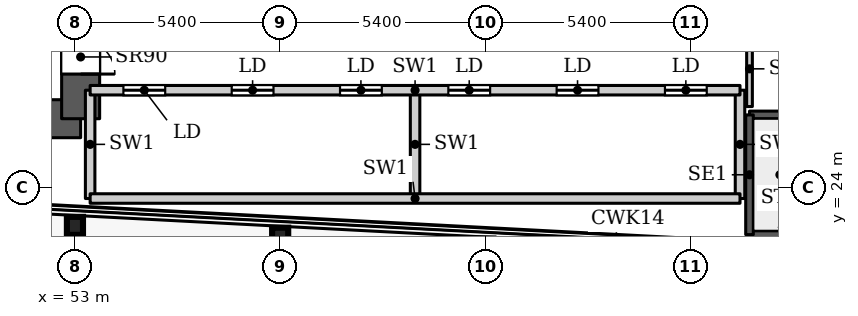
"""IFC4 building model, lengths in metres.
Left out: names, types, materials, properties, quantities, classifications, styles, units other than length and angle.
Written with IfcOpenShell. Run it as: python <this file> out.ifc"""

import sys

from ifc_helpers import new_model, si_unit, direction, frame, frame_2d, origin, origin_2d, place, context, subcontext, project, spatial, rectangle, i_section, extrude, source, transform, mapped, element, fill, save


model = new_model("IFC4")
c1 = context("Model", 3, precision=1e-05, world=origin(), true_north=direction((0.0, 1.0)))
c2 = subcontext(c1, "Body", "Model", "MODEL_VIEW")
j1 = project(units=[si_unit("LENGTHUNIT", "METRE"), si_unit("PLANEANGLEUNIT", "RADIAN")], contexts=[c1])
p1 = place(None, origin())
s1 = spatial("IfcSite", under=j1, at=p1, CompositionType="ELEMENT")
p2 = place(p1, origin())
s2 = spatial("IfcBuilding", under=s1, at=p2, CompositionType="ELEMENT")
p3 = place(p2, frame((0.0, 0.0, 81.2)))
s3 = spatial("IfcBuildingStorey", under=s2, at=p3, CompositionType="ELEMENT", Elevation=81.2)
for number, where, z_axis, x_axis in (
    (1, (58.4, 22.695, 0.0), (0.0, 0.0, 1.0), (1.0, 0.0, 0.0)),
    (2, (53.0, 22.98, 0.0), (0.0, 0.0, 1.0), (1.0, 0.0, 0.0)),
):
    element("IfcColumn", number, at=place(p3, frame(where, z_axis=z_axis, x_axis=x_axis)), inside=s3, PredefinedType="COLUMN", context=c2, shape_type="SweptSolid", body=[
        extrude(i_section(OverallWidth=0.424, OverallDepth=0.474, WebThickness=0.048, FlangeThickness=0.077, FilletRadius=0.014, at=origin_2d()), origin(), (0.0, 0.0, 1.0), 7.8),
    ])
p4 = place(p3, frame((34.75, 25.8, 0.0), z_axis=(0.0, 0.0, 1.0), x_axis=(1.0, 0.0, 0.0)))
e3 = element("IfcWall", 3, at=p4, inside=s3, PredefinedType="SHEAR", context=c2, shape_type="SweptSolid", body=[
    extrude(rectangle(XDim=18.4, YDim=1.0, at=frame_2d((9.2, 0.0))), origin(), (0.0, 0.0, 1.0), 7.8),
])
p5 = place(p3, frame((53.15, 25.8, 0.0), z_axis=(0.0, 0.0, 1.0), x_axis=(0.0, 1.0, 0.0)))
e4 = element("IfcWall", 4, at=p5, inside=s3, PredefinedType="SHEAR", context=c2, shape_type="SweptSolid", body=[
    extrude(rectangle(XDim=10.4, YDim=1.0, at=frame_2d((5.2, 0.0))), origin(), (0.0, 0.0, 1.0), 7.8),
])
p6 = place(p5, frame((1.175, 0.0, 0.0)))
e5 = element("IfcOpeningElement", 5, at=p6, cuts=e4, PredefinedType="OPENING", context=c2, shape_type="SweptSolid", body=[
    extrude(rectangle(XDim=0.9, YDim=2.2, at=frame_2d((0.45, 1.1))), frame((0.0, 0.51, 0.0), z_axis=(0.0, -1.0, 0.0), x_axis=(1.0, 0.0, 0.0)), (0.0, 0.0, 1.0), 1.02),
])
p7 = place(p5, frame((6.65, 0.0, 0.0)))
e6 = element("IfcOpeningElement", 6, at=p7, cuts=e4, PredefinedType="OPENING", context=c2, shape_type="SweptSolid", body=[
    extrude(rectangle(XDim=1.8, YDim=2.1, at=frame_2d((0.9, 1.05))), frame((0.0, 0.51, 0.0), z_axis=(0.0, -1.0, 0.0), x_axis=(1.0, 0.0, 0.0)), (0.0, 0.0, 1.0), 1.02),
])
p8 = place(p3, frame((70.75, 22.75, 0.0), z_axis=(0.0, 0.0, 1.0), x_axis=(1.0, 0.0, 0.0)))
e7 = element("IfcWall", 7, at=p8, inside=s3, PredefinedType="SHEAR", context=c2, shape_type="SweptSolid", body=[
    extrude(rectangle(XDim=9.16, YDim=0.2, at=frame_2d((4.58, 0.0))), origin(), (0.0, 0.0, 1.0), 7.8),
])
p9 = place(p3, frame((70.75, 25.9, 0.0), z_axis=(0.0, 0.0, 1.0), x_axis=(1.0, 0.0, 0.0)))
e8 = element("IfcWall", 8, at=p9, inside=s3, PredefinedType="SHEAR", context=c2, shape_type="SweptSolid", body=[
    extrude(rectangle(XDim=9.16, YDim=0.2, at=frame_2d((4.58, 0.0))), origin(), (0.0, 0.0, 1.0), 7.8),
])
p10 = place(p9, frame((7.81, 0.0, 0.0)))
e9 = element("IfcOpeningElement", 9, at=p10, cuts=e8, PredefinedType="OPENING", context=c2, shape_type="SweptSolid", body=[
    extrude(rectangle(XDim=1.1, YDim=2.2, at=frame_2d((0.55, 1.1))), frame((0.0, 0.11, 0.0), z_axis=(0.0, -1.0, 0.0), x_axis=(1.0, 0.0, 0.0)), (0.0, 0.0, 1.0), 0.22),
])
p11 = place(p3, frame((70.75, 22.75, 0.0), z_axis=(0.0, 0.0, 1.0), x_axis=(0.0, 1.0, 0.0)))
e10 = element("IfcWall", 10, at=p11, inside=s3, PredefinedType="SHEAR", context=c2, shape_type="SweptSolid", body=[
    extrude(rectangle(XDim=3.15, YDim=0.2, at=frame_2d((1.575, 0.0))), origin(), (0.0, 0.0, 1.0), 7.8),
])
for number, where, z_axis, x_axis in (
    (11, (53.4, 23.7, 0.0), (0.0, 0.0, 1.0), (0.0, 1.0, 0.0)),
    (12, (61.95, 23.7, 0.0), (0.0, 0.0, 1.0), (0.0, 1.0, 0.0)),
    (13, (70.5, 23.7, 0.0), (0.0, 0.0, 1.0), (0.0, 1.0, 0.0)),
):
    element("IfcWall", number, at=place(p3, frame(where, z_axis=z_axis, x_axis=x_axis)), inside=s3, PredefinedType="PARTITIONING", context=c2, shape_type="SweptSolid", body=[
        extrude(rectangle(XDim=2.85, YDim=0.25, at=frame_2d((1.425, 0.0))), origin(), (0.0, 0.0, 1.0), 7.8),
    ])
p12 = place(p3, frame((53.4, 23.7, 0.0), z_axis=(0.0, 0.0, 1.0), x_axis=(1.0, 0.0, 0.0)))
e14 = element("IfcWall", 14, at=p12, inside=s3, PredefinedType="PARTITIONING", context=c2, shape_type="SweptSolid", body=[
    extrude(rectangle(XDim=17.1, YDim=0.25, at=frame_2d((8.55, 0.0))), origin(), (0.0, 0.0, 1.0), 7.8),
])
p13 = place(p3, frame((53.4, 26.55, 0.0), z_axis=(0.0, 0.0, 1.0), x_axis=(1.0, 0.0, 0.0)))
e15 = element("IfcWall", 15, at=p13, inside=s3, PredefinedType="PARTITIONING", context=c2, shape_type="SweptSolid", body=[
    extrude(rectangle(XDim=17.1, YDim=0.25, at=frame_2d((8.55, 0.0))), origin(), (0.0, 0.0, 1.0), 7.8),
])
p14 = place(p13, frame((0.875, 0.0, 0.0)))
e16 = element("IfcOpeningElement", 16, at=p14, cuts=e15, PredefinedType="OPENING", context=c2, shape_type="SweptSolid", body=[
    extrude(rectangle(XDim=1.1, YDim=2.2, at=frame_2d((0.55, 1.1))), frame((0.0, 0.135, 0.0), z_axis=(0.0, -1.0, 0.0), x_axis=(1.0, 0.0, 0.0)), (0.0, 0.0, 1.0), 0.27),
])
p15 = place(p13, frame((3.725, 0.0, 0.0)))
e17 = element("IfcOpeningElement", 17, at=p15, cuts=e15, PredefinedType="OPENING", context=c2, shape_type="SweptSolid", body=[
    extrude(rectangle(XDim=1.1, YDim=2.2, at=frame_2d((0.55, 1.1))), frame((0.0, 0.135, 0.0), z_axis=(0.0, -1.0, 0.0), x_axis=(1.0, 0.0, 0.0)), (0.0, 0.0, 1.0), 0.27),
])
p16 = place(p13, frame((6.575, 0.0, 0.0)))
e18 = element("IfcOpeningElement", 18, at=p16, cuts=e15, PredefinedType="OPENING", context=c2, shape_type="SweptSolid", body=[
    extrude(rectangle(XDim=1.1, YDim=2.2, at=frame_2d((0.55, 1.1))), frame((0.0, 0.135, 0.0), z_axis=(0.0, -1.0, 0.0), x_axis=(1.0, 0.0, 0.0)), (0.0, 0.0, 1.0), 0.27),
])
p17 = place(p13, frame((9.425, 0.0, 0.0)))
e19 = element("IfcOpeningElement", 19, at=p17, cuts=e15, PredefinedType="OPENING", context=c2, shape_type="SweptSolid", body=[
    extrude(rectangle(XDim=1.1, YDim=2.2, at=frame_2d((0.55, 1.1))), frame((0.0, 0.135, 0.0), z_axis=(0.0, -1.0, 0.0), x_axis=(1.0, 0.0, 0.0)), (0.0, 0.0, 1.0), 0.27),
])
p18 = place(p13, frame((12.275, 0.0, 0.0)))
e20 = element("IfcOpeningElement", 20, at=p18, cuts=e15, PredefinedType="OPENING", context=c2, shape_type="SweptSolid", body=[
    extrude(rectangle(XDim=1.1, YDim=2.2, at=frame_2d((0.55, 1.1))), frame((0.0, 0.135, 0.0), z_axis=(0.0, -1.0, 0.0), x_axis=(1.0, 0.0, 0.0)), (0.0, 0.0, 1.0), 0.27),
])
p19 = place(p13, frame((15.125, 0.0, 0.0)))
e21 = element("IfcOpeningElement", 21, at=p19, cuts=e15, PredefinedType="OPENING", context=c2, shape_type="SweptSolid", body=[
    extrude(rectangle(XDim=1.1, YDim=2.2, at=frame_2d((0.55, 1.1))), frame((0.0, 0.135, 0.0), z_axis=(0.0, -1.0, 0.0), x_axis=(1.0, 0.0, 0.0)), (0.0, 0.0, 1.0), 0.27),
])
p20 = place(p3, frame((70.75, 26.12, 0.0), z_axis=(0.0, 0.0, 1.0), x_axis=(0.0, 1.0, 0.0)))
e22 = element("IfcWall", 22, at=p20, inside=s3, PredefinedType="PARTITIONING", context=c2, shape_type="SweptSolid", body=[
    extrude(rectangle(XDim=1.985, YDim=0.15, at=frame_2d((0.992, 0.0))), origin(), (0.0, 0.0, 1.0), 7.8),
])
m1 = source(origin(), c2, "Body", "SweptSolid", [
    extrude(rectangle(XDim=1.1, YDim=2.2, at=frame_2d((0.55, 1.1))), frame((0.0, 0.025, 0.0), z_axis=(0.0, -1.0, 0.0), x_axis=(1.0, 0.0, 0.0)), (0.0, 0.0, 1.0), 0.05),
])
p21 = place(p14, origin())
e23 = element("IfcDoor", 23, at=p21, inside=s3, OperationType="SLIDING_TO_LEFT", PredefinedType="DOOR", context=c2, shape_type="MappedRepresentation", body=[
    mapped(m1, transform((0.0, 0.0, 0.0), x_axis=(1.0, 0.0, 0.0), y_axis=(0.0, 1.0, 0.0), z_axis=(0.0, 0.0, 1.0), scale=1.0)),
])
fill(e16, e23)
p22 = place(p15, origin())
e24 = element("IfcDoor", 24, at=p22, inside=s3, OperationType="SLIDING_TO_LEFT", PredefinedType="DOOR", context=c2, shape_type="MappedRepresentation", body=[
    mapped(m1, transform((0.0, 0.0, 0.0), x_axis=(1.0, 0.0, 0.0), y_axis=(0.0, 1.0, 0.0), z_axis=(0.0, 0.0, 1.0), scale=1.0)),
])
fill(e17, e24)
p23 = place(p16, origin())
e25 = element("IfcDoor", 25, at=p23, inside=s3, OperationType="SLIDING_TO_LEFT", PredefinedType="DOOR", context=c2, shape_type="MappedRepresentation", body=[
    mapped(m1, transform((0.0, 0.0, 0.0), x_axis=(1.0, 0.0, 0.0), y_axis=(0.0, 1.0, 0.0), z_axis=(0.0, 0.0, 1.0), scale=1.0)),
])
fill(e18, e25)
p24 = place(p17, origin())
e26 = element("IfcDoor", 26, at=p24, inside=s3, OperationType="SLIDING_TO_LEFT", PredefinedType="DOOR", context=c2, shape_type="MappedRepresentation", body=[
    mapped(m1, transform((0.0, 0.0, 0.0), x_axis=(1.0, 0.0, 0.0), y_axis=(0.0, 1.0, 0.0), z_axis=(0.0, 0.0, 1.0), scale=1.0)),
])
fill(e19, e26)
p25 = place(p18, origin())
e27 = element("IfcDoor", 27, at=p25, inside=s3, OperationType="SLIDING_TO_LEFT", PredefinedType="DOOR", context=c2, shape_type="MappedRepresentation", body=[
    mapped(m1, transform((0.0, 0.0, 0.0), x_axis=(1.0, 0.0, 0.0), y_axis=(0.0, 1.0, 0.0), z_axis=(0.0, 0.0, 1.0), scale=1.0)),
])
fill(e20, e27)
p26 = place(p19, origin())
e28 = element("IfcDoor", 28, at=p26, inside=s3, OperationType="SLIDING_TO_LEFT", PredefinedType="DOOR", context=c2, shape_type="MappedRepresentation", body=[
    mapped(m1, transform((0.0, 0.0, 0.0), x_axis=(1.0, 0.0, 0.0), y_axis=(0.0, 1.0, 0.0), z_axis=(0.0, 0.0, 1.0), scale=1.0)),
])
fill(e21, e28)
m2 = source(origin(), c2, "Body", "SweptSolid", [
    extrude(rectangle(XDim=0.9, YDim=2.2, at=frame_2d((0.45, 1.1))), frame((0.0, 0.025, 0.0), z_axis=(0.0, -1.0, 0.0), x_axis=(1.0, 0.0, 0.0)), (0.0, 0.0, 1.0), 0.05),
])
p27 = place(p6, origin())
e29 = element("IfcDoor", 29, at=p27, inside=s3, OperationType="SINGLE_SWING_RIGHT", PredefinedType="DOOR", context=c2, shape_type="MappedRepresentation", body=[
    mapped(m2, transform((0.0, 0.0, 0.0), x_axis=(1.0, 0.0, 0.0), y_axis=(0.0, 1.0, 0.0), z_axis=(0.0, 0.0, 1.0), scale=1.0)),
])
fill(e5, e29)
save(model, sys.argv[1])
